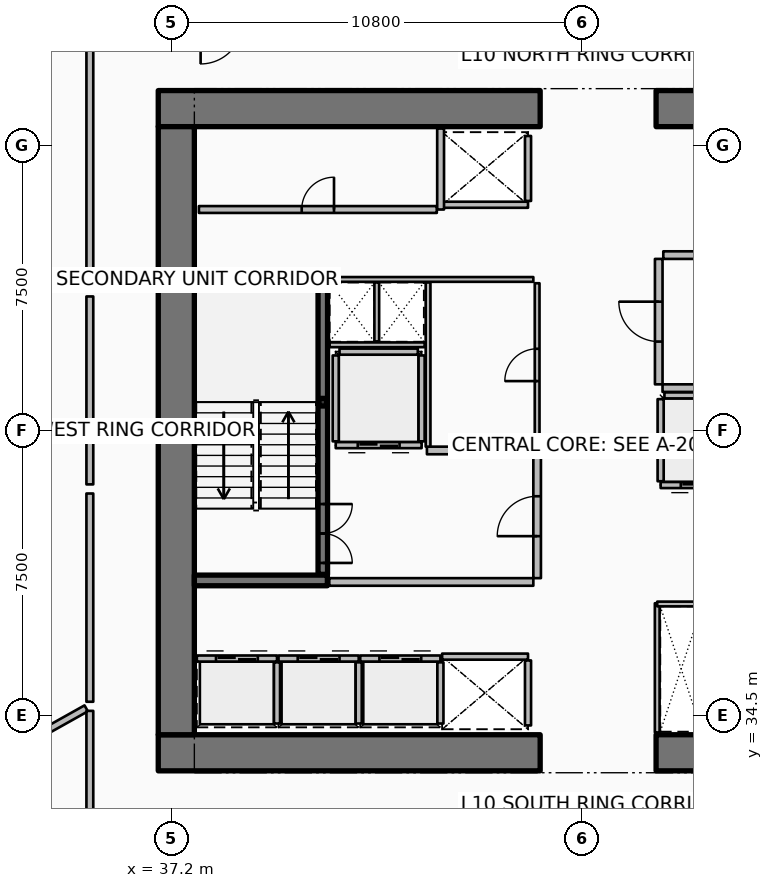
"""IFC4 building model, lengths in metres.
Left out: names, types, materials, properties, quantities, classifications, styles, units other than length and angle.
Written with IfcOpenShell. Run it as: python <this file> out.ifc"""

import sys

from ifc_helpers import new_model, si_unit, direction, frame, frame_2d, origin, origin_2d, place, context, subcontext, project, spatial, rectangle, hollow_rectangle, extrude, element, fill, save


model = new_model("IFC4")
c1 = context("Model", 3, precision=1e-05, world=origin(), true_north=direction((0.0, 1.0)))
c2 = subcontext(c1, "Body", "Model", "MODEL_VIEW")
j1 = project(units=[si_unit("LENGTHUNIT", "METRE"), si_unit("PLANEANGLEUNIT", "RADIAN")], contexts=[c1])
p1 = place(None, origin())
s1 = spatial("IfcSite", under=j1, at=p1, CompositionType="ELEMENT")
p2 = place(p1, origin())
s2 = spatial("IfcBuilding", under=s1, at=p2, CompositionType="ELEMENT")
p3 = place(p2, frame((0.0, 0.0, 45.15)))
s3 = spatial("IfcBuildingStorey", under=s2, at=p3, CompositionType="ELEMENT", Elevation=45.15)
p4 = place(p3, frame((36.85, 33.525, 0.0), z_axis=(0.0, 0.0, 1.0), x_axis=(1.0, 0.0, 0.0)))
e1 = element("IfcWall", 1, at=p4, inside=s3, PredefinedType="SHEAR", context=c2, shape_type="SweptSolid", body=[
    extrude(rectangle(XDim=10.05, YDim=0.95, at=frame_2d((5.025, 0.0))), origin(), (0.0, 0.0, 1.0), 3.75),
])
p5 = place(p3, frame((49.95, 33.525, 0.0), z_axis=(0.0, 0.0, 1.0), x_axis=(1.0, 0.0, 0.0)))
e2 = element("IfcWall", 2, at=p5, inside=s3, PredefinedType="SHEAR", context=c2, shape_type="SweptSolid", body=[
    extrude(rectangle(XDim=10.05, YDim=0.95, at=frame_2d((5.025, 0.0))), origin(), (0.0, 0.0, 1.0), 3.75),
])
p6 = place(p3, frame((36.85, 50.475, 0.0), z_axis=(0.0, 0.0, 1.0), x_axis=(1.0, 0.0, 0.0)))
e3 = element("IfcWall", 3, at=p6, inside=s3, PredefinedType="SHEAR", context=c2, shape_type="SweptSolid", body=[
    extrude(rectangle(XDim=10.05, YDim=0.95, at=frame_2d((5.025, 0.0))), origin(), (0.0, 0.0, 1.0), 3.75),
])
p7 = place(p3, frame((49.95, 50.475, 0.0), z_axis=(0.0, 0.0, 1.0), x_axis=(1.0, 0.0, 0.0)))
e4 = element("IfcWall", 4, at=p7, inside=s3, PredefinedType="SHEAR", context=c2, shape_type="SweptSolid", body=[
    extrude(rectangle(XDim=10.05, YDim=0.95, at=frame_2d((5.025, 0.0))), origin(), (0.0, 0.0, 1.0), 3.75),
])
p8 = place(p3, frame((37.325, 34.0, 0.0), z_axis=(0.0, 0.0, 1.0), x_axis=(0.0, 1.0, 0.0)))
e5 = element("IfcWall", 5, at=p8, inside=s3, PredefinedType="SHEAR", context=c2, shape_type="SweptSolid", body=[
    extrude(rectangle(XDim=16.0, YDim=0.95, at=frame_2d((8.0, 0.0))), origin(), (0.0, 0.0, 1.0), 3.75),
])
for number, where, z_axis, x_axis in (
    (6, (37.8, 38.06, 0.0), (0.0, 0.0, 1.0), (1.0, 0.0, 0.0)),
    (7, (37.8, 45.94, 0.0), (0.0, 0.0, 1.0), (1.0, 0.0, 0.0)),
):
    element("IfcWall", number, at=place(p3, frame(where, z_axis=z_axis, x_axis=x_axis)), inside=s3, PredefinedType="SHEAR", context=c2, shape_type="SweptSolid", body=[
        extrude(rectangle(XDim=3.5, YDim=0.28, at=frame_2d((1.75, 0.0))), origin(), (0.0, 0.0, 1.0), 3.75),
    ])
p9 = place(p3, frame((41.18, 42.75, 0.0), z_axis=(0.0, 0.0, 1.0), x_axis=(1.0, 0.0, 0.0)))
e8 = element("IfcColumn", 8, at=p9, inside=s3, PredefinedType="COLUMN", context=c2, shape_type="SweptSolid", body=[
    extrude(hollow_rectangle(XDim=0.2, YDim=0.2, WallThickness=0.01, InnerFilletRadius=0.01, OuterFilletRadius=0.02, at=origin_2d()), origin(), (0.0, 0.0, 1.0), 1.67),
])
p10 = place(p3, frame((41.18, 38.22, 0.0), z_axis=(0.0, 0.0, 1.0), x_axis=(0.0, 1.0, 0.0)))
e9 = element("IfcWall", 9, at=p10, inside=s3, PredefinedType="SOLIDWALL", context=c2, shape_type="SweptSolid", body=[
    extrude(rectangle(XDim=7.56, YDim=0.25, at=frame_2d((3.78, 0.0))), origin(), (0.0, 0.0, 1.0), 3.5),
])
p11 = place(p10, frame((0.3, 0.0, 0.0)))
e10 = element("IfcOpeningElement", 10, at=p11, cuts=e9, PredefinedType="OPENING", context=c2, shape_type="SweptSolid", body=[
    extrude(rectangle(XDim=1.55, YDim=2.15, at=frame_2d((0.775, 1.075))), frame((0.0, 0.135, 0.0), z_axis=(0.0, -1.0, 0.0), x_axis=(1.0, 0.0, 0.0)), (0.0, 0.0, 1.0), 0.27),
])
p12 = place(p3, frame((37.865, 36.005, 0.0), z_axis=(0.0, 0.0, 1.0), x_axis=(1.0, 0.0, 0.0)))
e11 = element("IfcWall", 11, at=p12, inside=s3, PredefinedType="PARTITIONING", context=c2, shape_type="SweptSolid", body=[
    extrude(rectangle(XDim=2.11, YDim=0.16, at=frame_2d((1.055, 0.0))), origin(), (0.0, 0.0, 1.0), 3.5),
])
p13 = place(p12, frame((0.505, 0.0, 0.0)))
e12 = element("IfcOpeningElement", 12, at=p13, cuts=e11, PredefinedType="OPENING", context=c2, shape_type="SweptSolid", body=[
    extrude(rectangle(XDim=1.1, YDim=2.1, at=frame_2d((0.55, 1.05))), frame((0.0, 0.09, 0.0), z_axis=(0.0, -1.0, 0.0), x_axis=(1.0, 0.0, 0.0)), (0.0, 0.0, 1.0), 0.18),
])
p14 = place(p3, frame((39.975, 34.295, 0.0), z_axis=(0.0, 0.0, 1.0), x_axis=(0.0, 1.0, 0.0)))
e13 = element("IfcWall", 13, at=p14, inside=s3, PredefinedType="PARTITIONING", context=c2, shape_type="SweptSolid", body=[
    extrude(rectangle(XDim=1.61, YDim=0.16, at=frame_2d((0.805, 0.0))), origin(), (0.0, 0.0, 1.0), 3.5),
])
p15 = place(p3, frame((40.015, 36.005, 0.0), z_axis=(0.0, 0.0, 1.0), x_axis=(1.0, 0.0, 0.0)))
e14 = element("IfcWall", 14, at=p15, inside=s3, PredefinedType="PARTITIONING", context=c2, shape_type="SweptSolid", body=[
    extrude(rectangle(XDim=2.11, YDim=0.16, at=frame_2d((1.055, 0.0))), origin(), (0.0, 0.0, 1.0), 3.5),
])
p16 = place(p15, frame((0.505, 0.0, 0.0)))
e15 = element("IfcOpeningElement", 15, at=p16, cuts=e14, PredefinedType="OPENING", context=c2, shape_type="SweptSolid", body=[
    extrude(rectangle(XDim=1.1, YDim=2.1, at=frame_2d((0.55, 1.05))), frame((0.0, 0.09, 0.0), z_axis=(0.0, -1.0, 0.0), x_axis=(1.0, 0.0, 0.0)), (0.0, 0.0, 1.0), 0.18),
])
p17 = place(p3, frame((42.125, 34.295, 0.0), z_axis=(0.0, 0.0, 1.0), x_axis=(0.0, 1.0, 0.0)))
e16 = element("IfcWall", 16, at=p17, inside=s3, PredefinedType="PARTITIONING", context=c2, shape_type="SweptSolid", body=[
    extrude(rectangle(XDim=1.61, YDim=0.16, at=frame_2d((0.805, 0.0))), origin(), (0.0, 0.0, 1.0), 3.5),
])
p18 = place(p3, frame((42.165, 36.005, 0.0), z_axis=(0.0, 0.0, 1.0), x_axis=(1.0, 0.0, 0.0)))
e17 = element("IfcWall", 17, at=p18, inside=s3, PredefinedType="PARTITIONING", context=c2, shape_type="SweptSolid", body=[
    extrude(rectangle(XDim=2.11, YDim=0.16, at=frame_2d((1.055, 0.0))), origin(), (0.0, 0.0, 1.0), 3.5),
])
p19 = place(p18, frame((0.505, 0.0, 0.0)))
e18 = element("IfcOpeningElement", 18, at=p19, cuts=e17, PredefinedType="OPENING", context=c2, shape_type="SweptSolid", body=[
    extrude(rectangle(XDim=1.1, YDim=2.1, at=frame_2d((0.55, 1.05))), frame((0.0, 0.09, 0.0), z_axis=(0.0, -1.0, 0.0), x_axis=(1.0, 0.0, 0.0)), (0.0, 0.0, 1.0), 0.18),
])
p20 = place(p3, frame((44.275, 34.295, 0.0), z_axis=(0.0, 0.0, 1.0), x_axis=(0.0, 1.0, 0.0)))
e19 = element("IfcWall", 19, at=p20, inside=s3, PredefinedType="PARTITIONING", context=c2, shape_type="SweptSolid", body=[
    extrude(rectangle(XDim=1.61, YDim=0.16, at=frame_2d((0.805, 0.0))), origin(), (0.0, 0.0, 1.0), 3.5),
])
p21 = place(p3, frame((46.58, 47.945, 0.0), z_axis=(0.0, 0.0, 1.0), x_axis=(-1.0, 0.0, 0.0)))
e20 = element("IfcWall", 20, at=p21, inside=s3, PredefinedType="PARTITIONING", context=c2, shape_type="SweptSolid", body=[
    extrude(rectangle(XDim=2.26, YDim=0.16, at=frame_2d((1.13, 0.0))), origin(), (0.0, 0.0, 1.0), 3.5),
])
p22 = place(p3, frame((46.58, 48.045, 0.0), z_axis=(0.0, 0.0, 1.0), x_axis=(0.0, 1.0, 0.0)))
e21 = element("IfcWall", 21, at=p22, inside=s3, PredefinedType="PARTITIONING", context=c2, shape_type="SweptSolid", body=[
    extrude(rectangle(XDim=1.71, YDim=0.16, at=frame_2d((0.855, 0.0))), origin(), (0.0, 0.0, 1.0), 3.5),
])
p23 = place(p3, frame((44.32, 36.055, 0.0), z_axis=(0.0, 0.0, 1.0), x_axis=(1.0, 0.0, 0.0)))
e22 = element("IfcWall", 22, at=p23, inside=s3, PredefinedType="PARTITIONING", context=c2, shape_type="SweptSolid", body=[
    extrude(rectangle(XDim=2.26, YDim=0.16, at=frame_2d((1.13, 0.0))), origin(), (0.0, 0.0, 1.0), 3.5),
])
p24 = place(p3, frame((46.58, 34.245, 0.0), z_axis=(0.0, 0.0, 1.0), x_axis=(0.0, 1.0, 0.0)))
e23 = element("IfcWall", 23, at=p24, inside=s3, PredefinedType="PARTITIONING", context=c2, shape_type="SweptSolid", body=[
    extrude(rectangle(XDim=1.71, YDim=0.16, at=frame_2d((0.855, 0.0))), origin(), (0.0, 0.0, 1.0), 3.5),
])
p25 = place(p3, frame((43.78, 41.62, 0.0), z_axis=(0.0, 0.0, 1.0), x_axis=(-1.0, 0.0, 0.0)))
e24 = element("IfcWall", 24, at=p25, inside=s3, PredefinedType="PARTITIONING", context=c2, shape_type="SweptSolid", body=[
    extrude(rectangle(XDim=2.26, YDim=0.16, at=frame_2d((1.13, 0.0))), origin(), (0.0, 0.0, 1.0), 3.5),
])
p26 = place(p25, frame((0.58, 0.0, 0.0)))
e25 = element("IfcOpeningElement", 25, at=p26, cuts=e24, PredefinedType="OPENING", context=c2, shape_type="SweptSolid", body=[
    extrude(rectangle(XDim=1.1, YDim=2.1, at=frame_2d((0.55, 1.05))), frame((0.0, 0.09, 0.0), z_axis=(0.0, -1.0, 0.0), x_axis=(1.0, 0.0, 0.0)), (0.0, 0.0, 1.0), 0.18),
])
for number, where, z_axis, x_axis in (
    (26, (43.78, 41.72, 0.0), (0.0, 0.0, 1.0), (0.0, 1.0, 0.0)),
    (27, (41.52, 41.72, 0.0), (0.0, 0.0, 1.0), (0.0, 1.0, 0.0)),
):
    element("IfcWall", number, at=place(p3, frame(where, z_axis=z_axis, x_axis=x_axis)), inside=s3, PredefinedType="PARTITIONING", context=c2, shape_type="SweptSolid", body=[
        extrude(rectangle(XDim=2.26, YDim=0.16, at=frame_2d((1.13, 0.0))), origin(), (0.0, 0.0, 1.0), 3.5),
    ])
p27 = place(p3, frame((41.62, 44.08, 0.0), z_axis=(0.0, 0.0, 1.0), x_axis=(1.0, 0.0, 0.0)))
e28 = element("IfcWall", 28, at=p27, inside=s3, PredefinedType="PARTITIONING", context=c2, shape_type="SweptSolid", body=[
    extrude(rectangle(XDim=2.06, YDim=0.16, at=frame_2d((1.03, 0.0))), origin(), (0.0, 0.0, 1.0), 3.5),
])
p28 = place(p3, frame((52.23, 40.57, 0.0), z_axis=(0.0, 0.0, 1.0), x_axis=(-1.0, 0.0, 0.0)))
e29 = element("IfcWall", 29, at=p28, inside=s3, PredefinedType="PARTITIONING", context=c2, shape_type="SweptSolid", body=[
    extrude(rectangle(XDim=2.16, YDim=0.16, at=frame_2d((1.08, 0.0))), origin(), (0.0, 0.0, 1.0), 3.5),
])
p29 = place(p28, frame((0.53, 0.0, 0.0)))
e30 = element("IfcOpeningElement", 30, at=p29, cuts=e29, PredefinedType="OPENING", context=c2, shape_type="SweptSolid", body=[
    extrude(rectangle(XDim=1.1, YDim=2.1, at=frame_2d((0.55, 1.05))), frame((0.0, 0.09, 0.0), z_axis=(0.0, -1.0, 0.0), x_axis=(1.0, 0.0, 0.0)), (0.0, 0.0, 1.0), 0.18),
])
p30 = place(p3, frame((50.07, 40.67, 0.0), z_axis=(0.0, 0.0, 1.0), x_axis=(0.0, 1.0, 0.0)))
e31 = element("IfcWall", 31, at=p30, inside=s3, PredefinedType="PARTITIONING", context=c2, shape_type="SweptSolid", body=[
    extrude(rectangle(XDim=2.16, YDim=0.16, at=frame_2d((1.08, 0.0))), origin(), (0.0, 0.0, 1.0), 3.5),
])
p31 = place(p3, frame((50.17, 42.93, 0.0), z_axis=(0.0, 0.0, 1.0), x_axis=(1.0, 0.0, 0.0)))
e32 = element("IfcWall", 32, at=p31, inside=s3, PredefinedType="PARTITIONING", context=c2, shape_type="SweptSolid", body=[
    extrude(rectangle(XDim=1.96, YDim=0.16, at=frame_2d((0.98, 0.0))), origin(), (0.0, 0.0, 1.0), 3.5),
])
p32 = place(p3, frame((37.92, 47.82, 0.0), z_axis=(0.0, 0.0, 1.0), x_axis=(1.0, 0.0, 0.0)))
e33 = element("IfcWall", 33, at=p32, inside=s3, PredefinedType="PARTITIONING", context=c2, shape_type="SweptSolid", body=[
    extrude(rectangle(XDim=6.26, YDim=0.18, at=frame_2d((3.13, 0.0))), origin(), (0.0, 0.0, 1.0), 3.5),
])
p33 = place(p32, frame((2.705, 0.0, 0.0)))
e34 = element("IfcOpeningElement", 34, at=p33, cuts=e33, PredefinedType="OPENING", context=c2, shape_type="SweptSolid", body=[
    extrude(rectangle(XDim=0.85, YDim=2.06, at=frame_2d((0.425, 1.03))), frame((0.0, 0.1, 0.0), z_axis=(0.0, -1.0, 0.0), x_axis=(1.0, 0.0, 0.0)), (0.0, 0.0, 1.0), 0.2),
])
p34 = place(p3, frame((44.28, 47.82, 0.0), z_axis=(0.0, 0.0, 1.0), x_axis=(0.0, 1.0, 0.0)))
e35 = element("IfcWall", 35, at=p34, inside=s3, PredefinedType="PARTITIONING", context=c2, shape_type="SweptSolid", body=[
    extrude(rectangle(XDim=2.13, YDim=0.18, at=frame_2d((1.065, 0.0))), origin(), (0.0, 0.0, 1.0), 3.5),
])
p35 = place(p3, frame((41.35, 38.02, 0.0), z_axis=(0.0, 0.0, 1.0), x_axis=(1.0, 0.0, 0.0)))
e36 = element("IfcWall", 36, at=p35, inside=s3, PredefinedType="PARTITIONING", context=c2, shape_type="SweptSolid", body=[
    extrude(rectangle(XDim=5.37, YDim=0.2, at=frame_2d((2.685, 0.0))), origin(), (0.0, 0.0, 1.0), 3.5),
])
p36 = place(p3, frame((43.92, 41.48, 0.0), z_axis=(0.0, 0.0, 1.0), x_axis=(1.0, 0.0, 0.0)))
e37 = element("IfcWall", 37, at=p36, inside=s3, PredefinedType="PARTITIONING", context=c2, shape_type="SweptSolid", body=[
    extrude(rectangle(XDim=2.8, YDim=0.2, at=frame_2d((1.4, 0.0))), origin(), (0.0, 0.0, 1.0), 3.5),
])
p37 = place(p3, frame((46.82, 38.12, 0.0), z_axis=(0.0, 0.0, 1.0), x_axis=(0.0, 1.0, 0.0)))
e38 = element("IfcWall", 38, at=p37, inside=s3, PredefinedType="PARTITIONING", context=c2, shape_type="SweptSolid", body=[
    extrude(rectangle(XDim=3.26, YDim=0.2, at=frame_2d((1.63, 0.0))), origin(), (0.0, 0.0, 1.0), 3.5),
])
p38 = place(p37, frame((1.105, 0.0, 0.0)))
e39 = element("IfcOpeningElement", 39, at=p38, cuts=e38, PredefinedType="OPENING", context=c2, shape_type="SweptSolid", body=[
    extrude(rectangle(XDim=1.05, YDim=2.1, at=frame_2d((0.525, 1.05))), frame((0.0, 0.11, 0.0), z_axis=(0.0, -1.0, 0.0), x_axis=(1.0, 0.0, 0.0)), (0.0, 0.0, 1.0), 0.22),
])
p39 = place(p3, frame((50.12, 43.12, 0.0), z_axis=(0.0, 0.0, 1.0), x_axis=(1.0, 0.0, 0.0)))
e40 = element("IfcWall", 40, at=p39, inside=s3, PredefinedType="PARTITIONING", context=c2, shape_type="SweptSolid", body=[
    extrude(rectangle(XDim=8.88, YDim=0.2, at=frame_2d((4.44, 0.0))), origin(), (0.0, 0.0, 1.0), 3.5),
])
p40 = place(p3, frame((50.14, 46.62, 0.0), z_axis=(0.0, 0.0, 1.0), x_axis=(1.0, 0.0, 0.0)))
e41 = element("IfcWall", 41, at=p40, inside=s3, PredefinedType="PARTITIONING", context=c2, shape_type="SweptSolid", body=[
    extrude(rectangle(XDim=1.02, YDim=0.2, at=frame_2d((0.51, 0.0))), origin(), (0.0, 0.0, 1.0), 3.5),
])
p41 = place(p3, frame((50.02, 43.22, 0.0), z_axis=(0.0, 0.0, 1.0), x_axis=(0.0, 1.0, 0.0)))
e42 = element("IfcWall", 42, at=p41, inside=s3, PredefinedType="PARTITIONING", context=c2, shape_type="SweptSolid", body=[
    extrude(rectangle(XDim=3.3, YDim=0.2, at=frame_2d((1.65, 0.0))), origin(), (0.0, 0.0, 1.0), 3.5),
])
p42 = place(p41, frame((1.125, 0.0, 0.0)))
e43 = element("IfcOpeningElement", 43, at=p42, cuts=e42, PredefinedType="OPENING", context=c2, shape_type="SweptSolid", body=[
    extrude(rectangle(XDim=1.05, YDim=2.1, at=frame_2d((0.525, 1.05))), frame((0.0, 0.11, 0.0), z_axis=(0.0, -1.0, 0.0), x_axis=(1.0, 0.0, 0.0)), (0.0, 0.0, 1.0), 0.22),
])
p43 = place(p3, frame((41.36, 45.98, 0.0), z_axis=(0.0, 0.0, 1.0), x_axis=(1.0, 0.0, 0.0)))
e44 = element("IfcWall", 44, at=p43, inside=s3, PredefinedType="PARTITIONING", context=c2, shape_type="SweptSolid", body=[
    extrude(rectangle(XDim=5.36, YDim=0.125, at=frame_2d((2.68, 0.0))), origin(), (0.0, 0.0, 1.0), 2.94),
])
p44 = place(p3, frame((41.36, 44.26, 0.0), z_axis=(0.0, 0.0, 1.0), x_axis=(1.0, 0.0, 0.0)))
e45 = element("IfcWall", 45, at=p44, inside=s3, PredefinedType="PARTITIONING", context=c2, shape_type="SweptSolid", body=[
    extrude(rectangle(XDim=2.5, YDim=0.125, at=frame_2d((1.25, 0.0))), origin(), (0.0, 0.0, 1.0), 2.94),
])
p45 = place(p3, frame((42.6, 44.35, 0.0), z_axis=(0.0, 0.0, 1.0), x_axis=(0.0, 1.0, 0.0)))
e46 = element("IfcWall", 46, at=p45, inside=s3, PredefinedType="PARTITIONING", context=c2, shape_type="SweptSolid", body=[
    extrude(rectangle(XDim=1.55, YDim=0.125, at=frame_2d((0.775, 0.0))), origin(), (0.0, 0.0, 1.0), 2.94),
])
p46 = place(p3, frame((49.98, 34.06, 0.0), z_axis=(0.0, 0.0, 1.0), x_axis=(0.0, 1.0, 0.0)))
e47 = element("IfcWall", 47, at=p46, inside=s3, PredefinedType="PARTITIONING", context=c2, shape_type="SweptSolid", body=[
    extrude(rectangle(XDim=3.4, YDim=0.125, at=frame_2d((1.7, 0.0))), origin(), (0.0, 0.0, 1.0), 2.94),
])
p47 = place(p3, frame((49.98, 37.44, 0.0), z_axis=(0.0, 0.0, 1.0), x_axis=(1.0, 0.0, 0.0)))
e48 = element("IfcWall", 48, at=p47, inside=s3, PredefinedType="PARTITIONING", context=c2, shape_type="SweptSolid", body=[
    extrude(rectangle(XDim=1.26, YDim=0.125, at=frame_2d((0.63, 0.0))), origin(), (0.0, 0.0, 1.0), 2.94),
])
p48 = place(p3, frame((43.95, 41.58, 0.0), z_axis=(0.0, 0.0, 1.0), x_axis=(0.0, 1.0, 0.0)))
e49 = element("IfcWall", 49, at=p48, inside=s3, PredefinedType="PARTITIONING", context=c2, shape_type="SweptSolid", body=[
    extrude(rectangle(XDim=4.32, YDim=0.125, at=frame_2d((2.16, 0.0))), origin(), (0.0, 0.0, 1.0), 2.94),
])
p49 = place(p3, frame((46.82, 41.58, 0.0), z_axis=(0.0, 0.0, 1.0), x_axis=(0.0, 1.0, 0.0)))
e50 = element("IfcWall", 50, at=p49, inside=s3, PredefinedType="PARTITIONING", context=c2, shape_type="SweptSolid", body=[
    extrude(rectangle(XDim=4.3, YDim=0.125, at=frame_2d((2.15, 0.0))), origin(), (0.0, 0.0, 1.0), 2.94),
])
p50 = place(p49, frame((1.725, 0.0, 0.0)))
e51 = element("IfcOpeningElement", 51, at=p50, cuts=e50, PredefinedType="OPENING", context=c2, shape_type="SweptSolid", body=[
    extrude(rectangle(XDim=0.85, YDim=2.06, at=frame_2d((0.425, 1.03))), frame((0.0, 0.073, 0.0), z_axis=(0.0, -1.0, 0.0), x_axis=(1.0, 0.0, 0.0)), (0.0, 0.0, 1.0), 0.145),
])
p51 = place(p3, frame((34.954, 34.694, 0.0), z_axis=(0.0, 0.0, 1.0), x_axis=(-0.872493465611, -0.488625779577, 0.0)))
e52 = element("IfcWall", 52, at=p51, inside=s3, PredefinedType="PARTITIONING", context=c2, shape_type="SweptSolid", body=[
    extrude(rectangle(XDim=16.586, YDim=0.18, at=frame_2d((8.293, 0.0))), origin(), (0.0, 0.0, 1.0), 2.867),
])
p52 = place(p3, frame((35.05, 52.089, 0.0), z_axis=(0.0, 0.0, 1.0), x_axis=(0.0, -1.0, 0.0)))
e53 = element("IfcWall", 53, at=p52, inside=s3, PredefinedType="PARTITIONING", context=c2, shape_type="SweptSolid", body=[
    extrude(rectangle(XDim=6.317, YDim=0.18, at=frame_2d((3.158, 0.0))), origin(), (0.0, 0.0, 1.0), 2.867),
])
p53 = place(p3, frame((35.05, 45.532, 0.0), z_axis=(0.0, 0.0, 1.0), x_axis=(0.0, -1.0, 0.0)))
e54 = element("IfcWall", 54, at=p53, inside=s3, PredefinedType="PARTITIONING", context=c2, shape_type="SweptSolid", body=[
    extrude(rectangle(XDim=4.945, YDim=0.18, at=frame_2d((2.472, 0.0))), origin(), (0.0, 0.0, 1.0), 2.867),
])
p54 = place(p3, frame((35.05, 40.347, 0.0), z_axis=(0.0, 0.0, 1.0), x_axis=(0.0, -1.0, 0.0)))
e55 = element("IfcWall", 55, at=p54, inside=s3, PredefinedType="PARTITIONING", context=c2, shape_type="SweptSolid", body=[
    extrude(rectangle(XDim=5.48, YDim=0.18, at=frame_2d((2.74, 0.0))), origin(), (0.0, 0.0, 1.0), 2.867),
])
p55 = place(p3, frame((35.05, 34.628, 0.0), z_axis=(0.0, 0.0, 1.0), x_axis=(0.0, -1.0, 0.0)))
e56 = element("IfcWall", 56, at=p55, inside=s3, PredefinedType="PARTITIONING", context=c2, shape_type="SweptSolid", body=[
    extrude(rectangle(XDim=3.258, YDim=0.18, at=frame_2d((1.629, 0.0))), origin(), (0.0, 0.0, 1.0), 2.867),
])
p56 = place(p11, origin())
e57 = element("IfcDoor", 57, at=p56, inside=s3, OperationType="DOUBLE_DOOR_SINGLE_SWING", PredefinedType="DOOR", context=c2, shape_type="SweptSolid", body=[
    extrude(rectangle(XDim=1.55, YDim=2.15, at=frame_2d((0.775, 1.075))), frame((0.0, 0.025, 0.0), z_axis=(0.0, -1.0, 0.0), x_axis=(1.0, 0.0, 0.0)), (0.0, 0.0, 1.0), 0.05),
])
fill(e10, e57)
p57 = place(p13, origin())
e58 = element("IfcDoor", 58, at=p57, inside=s3, OperationType="DOUBLE_DOOR_SLIDING", PredefinedType="DOOR", context=c2, shape_type="SweptSolid", body=[
    extrude(rectangle(XDim=1.1, YDim=2.1, at=frame_2d((0.55, 1.05))), frame((0.0, 0.025, 0.0), z_axis=(0.0, -1.0, 0.0), x_axis=(1.0, 0.0, 0.0)), (0.0, 0.0, 1.0), 0.05),
])
fill(e12, e58)
p58 = place(p16, origin())
e59 = element("IfcDoor", 59, at=p58, inside=s3, OperationType="DOUBLE_DOOR_SLIDING", PredefinedType="DOOR", context=c2, shape_type="SweptSolid", body=[
    extrude(rectangle(XDim=1.1, YDim=2.1, at=frame_2d((0.55, 1.05))), frame((0.0, 0.025, 0.0), z_axis=(0.0, -1.0, 0.0), x_axis=(1.0, 0.0, 0.0)), (0.0, 0.0, 1.0), 0.05),
])
fill(e15, e59)
p59 = place(p19, origin())
e60 = element("IfcDoor", 60, at=p59, inside=s3, OperationType="DOUBLE_DOOR_SLIDING", PredefinedType="DOOR", context=c2, shape_type="SweptSolid", body=[
    extrude(rectangle(XDim=1.1, YDim=2.1, at=frame_2d((0.55, 1.05))), frame((0.0, 0.025, 0.0), z_axis=(0.0, -1.0, 0.0), x_axis=(1.0, 0.0, 0.0)), (0.0, 0.0, 1.0), 0.05),
])
fill(e18, e60)
p60 = place(p26, origin())
e61 = element("IfcDoor", 61, at=p60, inside=s3, OperationType="DOUBLE_DOOR_SLIDING", PredefinedType="DOOR", context=c2, shape_type="SweptSolid", body=[
    extrude(rectangle(XDim=1.1, YDim=2.1, at=frame_2d((0.55, 1.05))), frame((0.0, 0.025, 0.0), z_axis=(0.0, -1.0, 0.0), x_axis=(1.0, 0.0, 0.0)), (0.0, 0.0, 1.0), 0.05),
])
fill(e25, e61)
p61 = place(p29, origin())
e62 = element("IfcDoor", 62, at=p61, inside=s3, OperationType="DOUBLE_DOOR_SLIDING", PredefinedType="DOOR", context=c2, shape_type="SweptSolid", body=[
    extrude(rectangle(XDim=1.1, YDim=2.1, at=frame_2d((0.55, 1.05))), frame((0.0, 0.025, 0.0), z_axis=(0.0, -1.0, 0.0), x_axis=(1.0, 0.0, 0.0)), (0.0, 0.0, 1.0), 0.05),
])
fill(e30, e62)
p62 = place(p33, origin())
e63 = element("IfcDoor", 63, at=p62, inside=s3, OperationType="SINGLE_SWING_RIGHT", PredefinedType="DOOR", context=c2, shape_type="SweptSolid", body=[
    extrude(rectangle(XDim=0.85, YDim=2.06, at=frame_2d((0.425, 1.03))), frame((0.0, 0.025, 0.0), z_axis=(0.0, -1.0, 0.0), x_axis=(1.0, 0.0, 0.0)), (0.0, 0.0, 1.0), 0.05),
])
fill(e34, e63)
p63 = place(p38, origin())
e64 = element("IfcDoor", 64, at=p63, inside=s3, OperationType="SINGLE_SWING_LEFT", PredefinedType="DOOR", context=c2, shape_type="SweptSolid", body=[
    extrude(rectangle(XDim=1.05, YDim=2.1, at=frame_2d((0.525, 1.05))), frame((0.0, 0.025, 0.0), z_axis=(0.0, -1.0, 0.0), x_axis=(1.0, 0.0, 0.0)), (0.0, 0.0, 1.0), 0.05),
])
fill(e39, e64)
p64 = place(p42, origin())
e65 = element("IfcDoor", 65, at=p64, inside=s3, OperationType="SINGLE_SWING_RIGHT", PredefinedType="DOOR", context=c2, shape_type="SweptSolid", body=[
    extrude(rectangle(XDim=1.05, YDim=2.1, at=frame_2d((0.525, 1.05))), frame((0.0, 0.025, 0.0), z_axis=(0.0, -1.0, 0.0), x_axis=(1.0, 0.0, 0.0)), (0.0, 0.0, 1.0), 0.05),
])
fill(e43, e65)
p65 = place(p50, origin())
e66 = element("IfcDoor", 66, at=p65, inside=s3, OperationType="SINGLE_SWING_LEFT", PredefinedType="DOOR", context=c2, shape_type="SweptSolid", body=[
    extrude(rectangle(XDim=0.85, YDim=2.06, at=frame_2d((0.425, 1.03))), frame((0.0, 0.025, 0.0), z_axis=(0.0, -1.0, 0.0), x_axis=(1.0, 0.0, 0.0)), (0.0, 0.0, 1.0), 0.05),
])
fill(e51, e66)
save(model, sys.argv[1])
